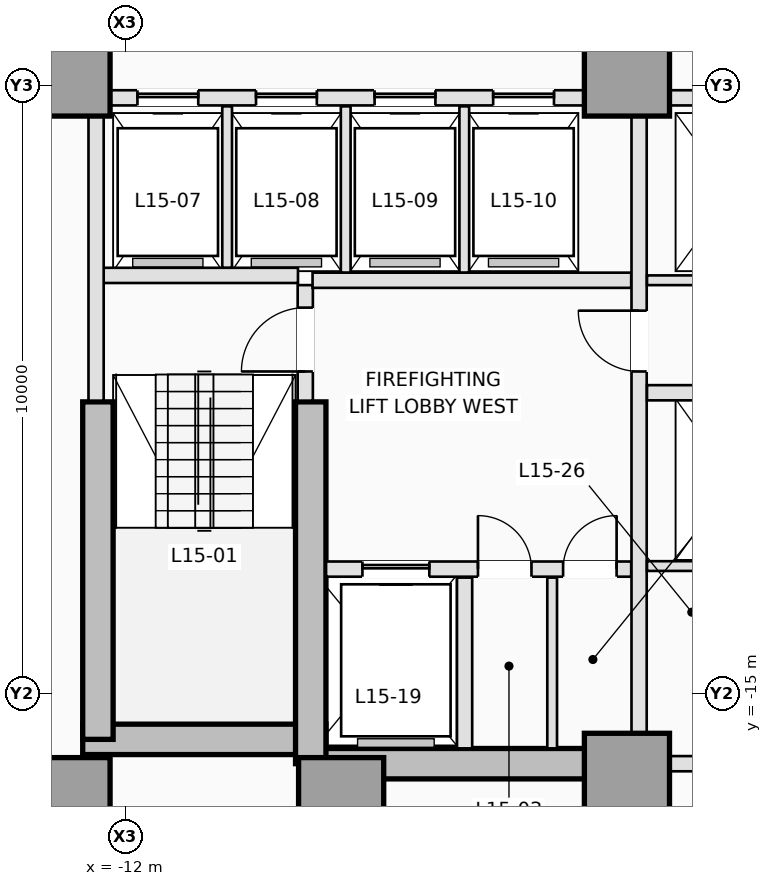
"""IFC4 building model, lengths in metres.
Left out: names, types, materials, properties, quantities, classifications, styles, units other than length and angle.
Written with IfcOpenShell. Run it as: python <this file> out.ifc"""

import sys

from ifc_helpers import new_model, si_unit, direction, frame, frame_2d, origin, origin_2d, place, context, subcontext, project, spatial, rectangle, extrude, element, fill, save


model = new_model("IFC4")
c1 = context("Model", 3, precision=1e-05, world=origin(), true_north=direction((0.0, 1.0)))
c2 = subcontext(c1, "Body", "Model", "MODEL_VIEW")
j1 = project(units=[si_unit("LENGTHUNIT", "METRE"), si_unit("PLANEANGLEUNIT", "RADIAN")], contexts=[c1])
p1 = place(None, origin())
s1 = spatial("IfcSite", under=j1, at=p1, CompositionType="ELEMENT")
p2 = place(p1, origin())
s2 = spatial("IfcBuilding", under=s1, at=p2, CompositionType="ELEMENT")
p3 = place(p2, frame((0.0, 0.0, 59.1)))
s3 = spatial("IfcBuildingStorey", under=s2, at=p3, CompositionType="ELEMENT", Elevation=59.1)
p4 = place(p3, frame((-12.7, -15.75, 0.0), z_axis=(0.0, 0.0, 1.0), x_axis=(1.0, 0.0, 0.0)))
e1 = element("IfcWall", 1, at=p4, inside=s3, PredefinedType="SHEAR", context=c2, shape_type="SweptSolid", body=[
    extrude(rectangle(XDim=4.0, YDim=0.5, at=frame_2d((2.0, 0.0))), origin(), (0.0, 0.0, 1.0), 3.5),
])
p5 = place(p3, frame((-8.95, -16.15, 0.0), z_axis=(0.0, 0.0, 1.0), x_axis=(1.0, 0.0, 0.0)))
e2 = element("IfcWall", 2, at=p5, inside=s3, PredefinedType="SHEAR", context=c2, shape_type="SweptSolid", body=[
    extrude(rectangle(XDim=5.2, YDim=0.5, at=frame_2d((2.6, 0.0))), origin(), (0.0, 0.0, 1.0), 3.5),
])
p6 = place(p3, frame((-12.45, -15.75, 0.0), z_axis=(0.0, 0.0, 1.0), x_axis=(0.0, 1.0, 0.0)))
e3 = element("IfcWall", 3, at=p6, inside=s3, PredefinedType="SHEAR", context=c2, shape_type="SweptSolid", body=[
    extrude(rectangle(XDim=5.55, YDim=0.5, at=frame_2d((2.775, 0.0))), origin(), (0.0, 0.0, 1.0), 3.5),
])
p7 = place(p3, frame((-8.95, -16.15, 0.0), z_axis=(0.0, 0.0, 1.0), x_axis=(0.0, 1.0, 0.0)))
e4 = element("IfcWall", 4, at=p7, inside=s3, PredefinedType="SHEAR", context=c2, shape_type="SweptSolid", body=[
    extrude(rectangle(XDim=5.95, YDim=0.5, at=frame_2d((2.975, 0.0))), origin(), (0.0, 0.0, 1.0), 3.5),
])
for number, where, z_axis, x_axis in (
    (5, (-12.95, -16.75, 0.0), (0.0, 0.0, 1.0), (1.0, 0.0, 0.0)),
    (6, (-8.45, -16.75, 0.0), (0.0, 0.0, 1.0), (1.0, 0.0, 0.0)),
    (7, (-3.75, -16.35, 0.0), (0.0, 0.0, 1.0), (1.0, 0.0, 0.0)),
    (8, (-12.95, -4.8, 0.0), (0.0, 0.0, 1.0), (1.0, 0.0, 0.0)),
    (9, (-3.75, -4.8, 0.0), (0.0, 0.0, 1.0), (1.0, 0.0, 0.0)),
):
    element("IfcColumn", number, at=place(p3, frame(where, z_axis=z_axis, x_axis=x_axis)), inside=s3, PredefinedType="COLUMN", context=c2, shape_type="SweptSolid", body=[
        extrude(rectangle(XDim=1.4, YDim=1.4, at=origin_2d()), origin(), (0.0, 0.0, 1.0), 3.5),
    ])
p8 = place(p3, frame((-9.04, -10.18, 0.0), z_axis=(0.0, 0.0, 1.0), x_axis=(0.0, 1.0, 0.0)))
e10 = element("IfcWall", 10, at=p8, inside=s3, PredefinedType="PARTITIONING", context=c2, shape_type="SweptSolid", body=[
    extrude(rectangle(XDim=1.9, YDim=0.25, at=frame_2d((0.95, 0.0))), origin(), (0.0, 0.0, 1.0), 3.25),
])
p9 = place(p8, frame((0.48, 0.0, 0.0)))
e11 = element("IfcOpeningElement", 11, at=p9, cuts=e10, PredefinedType="OPENING", context=c2, shape_type="SweptSolid", body=[
    extrude(rectangle(XDim=1.05, YDim=2.15, at=frame_2d((0.525, 1.075))), frame((0.0, 0.135, 0.0), z_axis=(0.0, -1.0, 0.0), x_axis=(1.0, 0.0, 0.0)), (0.0, 0.0, 1.0), 0.27),
])
p10 = place(p3, frame((-12.38, -8.12, 0.0), z_axis=(0.0, 0.0, 1.0), x_axis=(1.0, 0.0, 0.0)))
e12 = element("IfcWall", 12, at=p10, inside=s3, PredefinedType="PARTITIONING", context=c2, shape_type="SweptSolid", body=[
    extrude(rectangle(XDim=3.22, YDim=0.25, at=frame_2d((1.61, 0.0))), origin(), (0.0, 0.0, 1.0), 3.25),
])
p11 = place(p3, frame((-12.48, -10.18, 0.0), z_axis=(0.0, 0.0, 1.0), x_axis=(0.0, 1.0, 0.0)))
e13 = element("IfcWall", 13, at=p11, inside=s3, PredefinedType="PARTITIONING", context=c2, shape_type="SweptSolid", body=[
    extrude(rectangle(XDim=4.678, YDim=0.25, at=frame_2d((2.339, 0.0))), origin(), (0.0, 0.0, 1.0), 3.25),
])
p12 = place(p3, frame((-8.698, -12.95, 0.0), z_axis=(0.0, 0.0, 1.0), x_axis=(1.0, 0.0, 0.0)))
e14 = element("IfcWall", 14, at=p12, inside=s3, PredefinedType="PARTITIONING", context=c2, shape_type="SweptSolid", body=[
    extrude(rectangle(XDim=5.018, YDim=0.25, at=frame_2d((2.509, 0.0))), origin(), (0.0, 0.0, 1.0), 3.25),
])
p13 = place(p12, frame((0.598, 0.0, 0.0)))
e15 = element("IfcOpeningElement", 15, at=p13, cuts=e14, PredefinedType="OPENING", context=c2, shape_type="SweptSolid", body=[
    extrude(rectangle(XDim=1.1, YDim=2.15, at=frame_2d((0.55, 1.075))), frame((0.0, 0.135, 0.0), z_axis=(0.0, -1.0, 0.0), x_axis=(1.0, 0.0, 0.0)), (0.0, 0.0, 1.0), 0.27),
])
p14 = place(p12, frame((2.498, 0.0, 0.0)))
e16 = element("IfcOpeningElement", 16, at=p14, cuts=e14, PredefinedType="OPENING", context=c2, shape_type="SweptSolid", body=[
    extrude(rectangle(XDim=0.88, YDim=2.1, at=frame_2d((0.44, 1.05))), frame((0.0, 0.135, 0.0), z_axis=(0.0, -1.0, 0.0), x_axis=(1.0, 0.0, 0.0)), (0.0, 0.0, 1.0), 0.27),
])
p15 = place(p12, frame((3.898, 0.0, 0.0)))
e17 = element("IfcOpeningElement", 17, at=p15, cuts=e14, PredefinedType="OPENING", context=c2, shape_type="SweptSolid", body=[
    extrude(rectangle(XDim=0.88, YDim=2.1, at=frame_2d((0.44, 1.05))), frame((0.0, 0.135, 0.0), z_axis=(0.0, -1.0, 0.0), x_axis=(1.0, 0.0, 0.0)), (0.0, 0.0, 1.0), 0.27),
])
p16 = place(p3, frame((-6.42, -15.898, 0.0), z_axis=(0.0, 0.0, 1.0), x_axis=(0.0, 1.0, 0.0)))
e18 = element("IfcWall", 18, at=p16, inside=s3, PredefinedType="PARTITIONING", context=c2, shape_type="SweptSolid", body=[
    extrude(rectangle(XDim=2.808, YDim=0.25, at=frame_2d((1.404, 0.0))), origin(), (0.0, 0.0, 1.0), 3.25),
])
p17 = place(p3, frame((-4.98, -15.898, 0.0), z_axis=(0.0, 0.0, 1.0), x_axis=(0.0, 1.0, 0.0)))
e19 = element("IfcWall", 19, at=p17, inside=s3, PredefinedType="PARTITIONING", context=c2, shape_type="SweptSolid", body=[
    extrude(rectangle(XDim=2.808, YDim=0.16, at=frame_2d((1.404, 0.0))), origin(), (0.0, 0.0, 1.0), 3.25),
])
p18 = place(p3, frame((-8.92, -8.2, 0.0), z_axis=(0.0, 0.0, 1.0), x_axis=(1.0, 0.0, 0.0)))
e20 = element("IfcWall", 20, at=p18, inside=s3, PredefinedType="PARTITIONING", context=c2, shape_type="SweptSolid", body=[
    extrude(rectangle(XDim=5.24, YDim=0.25, at=frame_2d((2.62, 0.0))), origin(), (0.0, 0.0, 1.0), 3.25),
])
p19 = place(p3, frame((-3.55, -15.648, 0.0), z_axis=(0.0, 0.0, 1.0), x_axis=(0.0, 1.0, 0.0)))
e21 = element("IfcWall", 21, at=p19, inside=s3, PredefinedType="PARTITIONING", context=c2, shape_type="SweptSolid", body=[
    extrude(rectangle(XDim=10.146, YDim=0.25, at=frame_2d((5.073, 0.0))), origin(), (0.0, 0.0, 1.0), 3.25),
])
p20 = place(p19, frame((5.948, 0.0, 0.0)))
e22 = element("IfcOpeningElement", 22, at=p20, cuts=e21, PredefinedType="OPENING", context=c2, shape_type="SweptSolid", body=[
    extrude(rectangle(XDim=1.0, YDim=2.15, at=frame_2d((0.5, 1.075))), frame((0.0, 0.135, 0.0), z_axis=(0.0, -1.0, 0.0), x_axis=(1.0, 0.0, 0.0)), (0.0, 0.0, 1.0), 0.27),
])
p21 = place(p3, frame((-12.248, -5.2, 0.0), z_axis=(0.0, 0.0, 1.0), x_axis=(1.0, 0.0, 0.0)))
e23 = element("IfcWall", 23, at=p21, inside=s3, PredefinedType="PARTITIONING", context=c2, shape_type="SweptSolid", body=[
    extrude(rectangle(XDim=7.796, YDim=0.25, at=frame_2d((3.898, 0.0))), origin(), (0.0, 0.0, 1.0), 3.25),
])
p22 = place(p21, frame((0.448, 0.0, 0.0)))
e24 = element("IfcOpeningElement", 24, at=p22, cuts=e23, PredefinedType="OPENING", context=c2, shape_type="SweptSolid", body=[
    extrude(rectangle(XDim=1.0, YDim=2.15, at=frame_2d((0.5, 1.075))), frame((0.0, 0.135, 0.0), z_axis=(0.0, -1.0, 0.0), x_axis=(1.0, 0.0, 0.0)), (0.0, 0.0, 1.0), 0.27),
])
p23 = place(p21, frame((2.398, 0.0, 0.0)))
e25 = element("IfcOpeningElement", 25, at=p23, cuts=e23, PredefinedType="OPENING", context=c2, shape_type="SweptSolid", body=[
    extrude(rectangle(XDim=1.0, YDim=2.15, at=frame_2d((0.5, 1.075))), frame((0.0, 0.135, 0.0), z_axis=(0.0, -1.0, 0.0), x_axis=(1.0, 0.0, 0.0)), (0.0, 0.0, 1.0), 0.27),
])
p24 = place(p21, frame((4.348, 0.0, 0.0)))
e26 = element("IfcOpeningElement", 26, at=p24, cuts=e23, PredefinedType="OPENING", context=c2, shape_type="SweptSolid", body=[
    extrude(rectangle(XDim=1.0, YDim=2.15, at=frame_2d((0.5, 1.075))), frame((0.0, 0.135, 0.0), z_axis=(0.0, -1.0, 0.0), x_axis=(1.0, 0.0, 0.0)), (0.0, 0.0, 1.0), 0.27),
])
p25 = place(p21, frame((6.298, 0.0, 0.0)))
e27 = element("IfcOpeningElement", 27, at=p25, cuts=e23, PredefinedType="OPENING", context=c2, shape_type="SweptSolid", body=[
    extrude(rectangle(XDim=1.0, YDim=2.15, at=frame_2d((0.5, 1.075))), frame((0.0, 0.135, 0.0), z_axis=(0.0, -1.0, 0.0), x_axis=(1.0, 0.0, 0.0)), (0.0, 0.0, 1.0), 0.27),
])
p26 = place(p3, frame((-3.048, -5.2, 0.0), z_axis=(0.0, 0.0, 1.0), x_axis=(1.0, 0.0, 0.0)))
e28 = element("IfcWall", 28, at=p26, inside=s3, PredefinedType="PARTITIONING", context=c2, shape_type="SweptSolid", body=[
    extrude(rectangle(XDim=2.098, YDim=0.25, at=frame_2d((1.049, 0.0))), origin(), (0.0, 0.0, 1.0), 3.25),
])
p27 = place(p3, frame((-10.325, -7.993, 0.0), z_axis=(0.0, 0.0, 1.0), x_axis=(0.0, 1.0, 0.0)))
e29 = element("IfcWall", 29, at=p27, inside=s3, PredefinedType="PARTITIONING", context=c2, shape_type="SweptSolid", body=[
    extrude(rectangle(XDim=2.653, YDim=0.16, at=frame_2d((1.326, 0.0))), origin(), (0.0, 0.0, 1.0), 3.25),
])
for number, where, z_axis, x_axis in (
    (30, (-8.375, -8.073, 0.0), (0.0, 0.0, 1.0), (0.0, 1.0, 0.0)),
    (31, (-6.425, -8.073, 0.0), (0.0, 0.0, 1.0), (0.0, 1.0, 0.0)),
):
    element("IfcWall", number, at=place(p3, frame(where, z_axis=z_axis, x_axis=x_axis)), inside=s3, PredefinedType="PARTITIONING", context=c2, shape_type="SweptSolid", body=[
        extrude(rectangle(XDim=2.733, YDim=0.16, at=frame_2d((1.366, 0.0))), origin(), (0.0, 0.0, 1.0), 3.25),
    ])
p28 = place(p3, frame((-3.048, -16.15, 0.0), z_axis=(0.0, 0.0, 1.0), x_axis=(1.0, 0.0, 0.0)))
e32 = element("IfcWall", 32, at=p28, inside=s3, PredefinedType="PARTITIONING", context=c2, shape_type="SweptSolid", body=[
    extrude(rectangle(XDim=6.096, YDim=0.25, at=frame_2d((3.048, 0.0))), origin(), (0.0, 0.0, 1.0), 2.3),
])
p29 = place(p3, frame((-3.42, -8.2, 0.0), z_axis=(0.0, 0.0, 1.0), x_axis=(1.0, 0.0, 0.0)))
e33 = element("IfcWall", 33, at=p29, inside=s3, PredefinedType="PARTITIONING", context=c2, shape_type="SweptSolid", body=[
    extrude(rectangle(XDim=2.47, YDim=0.16, at=frame_2d((1.235, 0.0))), origin(), (0.0, 0.0, 1.0), 3.25),
])
p30 = place(p3, frame((-3.42, -10.05, 0.0), z_axis=(0.0, 0.0, 1.0), x_axis=(1.0, 0.0, 0.0)))
e34 = element("IfcWall", 34, at=p30, inside=s3, PredefinedType="PARTITIONING", context=c2, shape_type="SweptSolid", body=[
    extrude(rectangle(XDim=2.47, YDim=0.25, at=frame_2d((1.235, 0.0))), origin(), (0.0, 0.0, 1.0), 3.25),
])
p31 = place(p3, frame((-3.42, -12.9, 0.0), z_axis=(0.0, 0.0, 1.0), x_axis=(1.0, 0.0, 0.0)))
e35 = element("IfcWall", 35, at=p31, inside=s3, PredefinedType="PARTITIONING", context=c2, shape_type="SweptSolid", body=[
    extrude(rectangle(XDim=6.84, YDim=0.16, at=frame_2d((3.42, 0.0))), origin(), (0.0, 0.0, 1.0), 3.25),
])
p32 = place(p31, frame((2.98, 0.0, 0.0)))
e36 = element("IfcOpeningElement", 36, at=p32, cuts=e35, PredefinedType="OPENING", context=c2, shape_type="SweptSolid", body=[
    extrude(rectangle(XDim=0.88, YDim=2.12, at=frame_2d((0.44, 1.06))), frame((0.0, 0.09, 0.0), z_axis=(0.0, -1.0, 0.0), x_axis=(1.0, 0.0, 0.0)), (0.0, 0.0, 1.0), 0.18),
])
p33 = place(p22, origin())
e37 = element("IfcDoor", 37, at=p33, inside=s3, OperationType="SLIDING_TO_LEFT", PredefinedType="DOOR", context=c2, shape_type="SweptSolid", body=[
    extrude(rectangle(XDim=1.0, YDim=2.15, at=frame_2d((0.5, 1.075))), frame((0.0, 0.025, 0.0), z_axis=(0.0, -1.0, 0.0), x_axis=(1.0, 0.0, 0.0)), (0.0, 0.0, 1.0), 0.05),
])
fill(e24, e37)
p34 = place(p23, origin())
e38 = element("IfcDoor", 38, at=p34, inside=s3, OperationType="SLIDING_TO_LEFT", PredefinedType="DOOR", context=c2, shape_type="SweptSolid", body=[
    extrude(rectangle(XDim=1.0, YDim=2.15, at=frame_2d((0.5, 1.075))), frame((0.0, 0.025, 0.0), z_axis=(0.0, -1.0, 0.0), x_axis=(1.0, 0.0, 0.0)), (0.0, 0.0, 1.0), 0.05),
])
fill(e25, e38)
p35 = place(p24, origin())
e39 = element("IfcDoor", 39, at=p35, inside=s3, OperationType="SLIDING_TO_LEFT", PredefinedType="DOOR", context=c2, shape_type="SweptSolid", body=[
    extrude(rectangle(XDim=1.0, YDim=2.15, at=frame_2d((0.5, 1.075))), frame((0.0, 0.025, 0.0), z_axis=(0.0, -1.0, 0.0), x_axis=(1.0, 0.0, 0.0)), (0.0, 0.0, 1.0), 0.05),
])
fill(e26, e39)
p36 = place(p25, origin())
e40 = element("IfcDoor", 40, at=p36, inside=s3, OperationType="SLIDING_TO_LEFT", PredefinedType="DOOR", context=c2, shape_type="SweptSolid", body=[
    extrude(rectangle(XDim=1.0, YDim=2.15, at=frame_2d((0.5, 1.075))), frame((0.0, 0.025, 0.0), z_axis=(0.0, -1.0, 0.0), x_axis=(1.0, 0.0, 0.0)), (0.0, 0.0, 1.0), 0.05),
])
fill(e27, e40)
p37 = place(p13, origin())
e41 = element("IfcDoor", 41, at=p37, inside=s3, OperationType="SLIDING_TO_LEFT", PredefinedType="DOOR", context=c2, shape_type="SweptSolid", body=[
    extrude(rectangle(XDim=1.1, YDim=2.15, at=frame_2d((0.55, 1.075))), frame((0.0, 0.025, 0.0), z_axis=(0.0, -1.0, 0.0), x_axis=(1.0, 0.0, 0.0)), (0.0, 0.0, 1.0), 0.05),
])
fill(e15, e41)
p38 = place(p9, origin())
e42 = element("IfcDoor", 42, at=p38, inside=s3, OperationType="SINGLE_SWING_LEFT", PredefinedType="DOOR", context=c2, shape_type="SweptSolid", body=[
    extrude(rectangle(XDim=1.05, YDim=2.15, at=frame_2d((0.525, 1.075))), frame((0.0, 0.025, 0.0), z_axis=(0.0, -1.0, 0.0), x_axis=(1.0, 0.0, 0.0)), (0.0, 0.0, 1.0), 0.05),
])
fill(e11, e42)
p39 = place(p14, origin())
e43 = element("IfcDoor", 43, at=p39, inside=s3, OperationType="SINGLE_SWING_LEFT", PredefinedType="TRAPDOOR", context=c2, shape_type="SweptSolid", body=[
    extrude(rectangle(XDim=0.88, YDim=2.1, at=frame_2d((0.44, 1.05))), frame((0.0, 0.025, 0.0), z_axis=(0.0, -1.0, 0.0), x_axis=(1.0, 0.0, 0.0)), (0.0, 0.0, 1.0), 0.05),
])
fill(e16, e43)
p40 = place(p15, origin())
e44 = element("IfcDoor", 44, at=p40, inside=s3, OperationType="SINGLE_SWING_RIGHT", PredefinedType="TRAPDOOR", context=c2, shape_type="SweptSolid", body=[
    extrude(rectangle(XDim=0.88, YDim=2.1, at=frame_2d((0.44, 1.05))), frame((0.0, 0.025, 0.0), z_axis=(0.0, -1.0, 0.0), x_axis=(1.0, 0.0, 0.0)), (0.0, 0.0, 1.0), 0.05),
])
fill(e17, e44)
p41 = place(p20, origin())
e45 = element("IfcDoor", 45, at=p41, inside=s3, OperationType="SINGLE_SWING_RIGHT", PredefinedType="DOOR", context=c2, shape_type="SweptSolid", body=[
    extrude(rectangle(XDim=1.0, YDim=2.15, at=frame_2d((0.5, 1.075))), frame((0.0, 0.025, 0.0), z_axis=(0.0, -1.0, 0.0), x_axis=(1.0, 0.0, 0.0)), (0.0, 0.0, 1.0), 0.05),
])
fill(e22, e45)
save(model, sys.argv[1])
